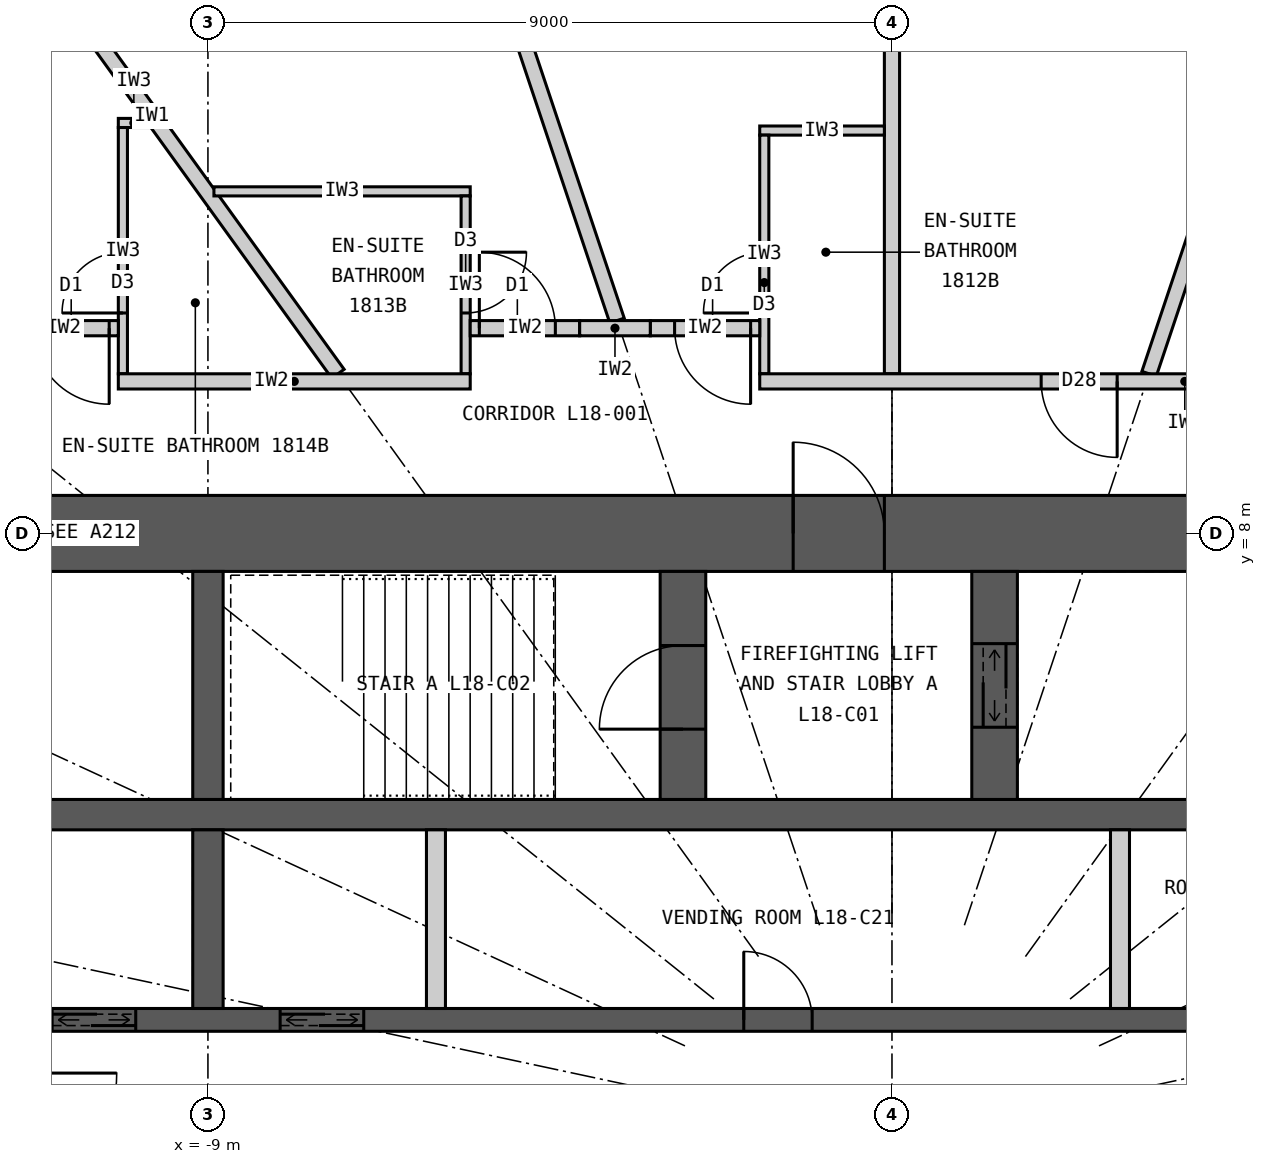
"""IFC4 building model, lengths in metres.
Left out: names, types, materials, properties, quantities, classifications, styles, units other than length and angle.
Written with IfcOpenShell. Run it as: python <this file> out.ifc"""

import sys

from ifc_helpers import new_model, si_unit, direction, frame, frame_2d, origin, place, context, subcontext, project, spatial, rectangle, extrude, element, fill, save


model = new_model("IFC4")
c1 = context("Model", 3, precision=1e-05, world=origin(), true_north=direction((0.0, 1.0)))
c2 = subcontext(c1, "Body", "Model", "MODEL_VIEW")
j1 = project(units=[si_unit("LENGTHUNIT", "METRE"), si_unit("PLANEANGLEUNIT", "RADIAN")], contexts=[c1])
p1 = place(None, origin())
s1 = spatial("IfcSite", under=j1, at=p1, CompositionType="ELEMENT")
p2 = place(p1, origin())
s2 = spatial("IfcBuilding", under=s1, at=p2, CompositionType="ELEMENT")
p3 = place(p2, frame((0.0, 0.0, 73.8)))
s3 = spatial("IfcBuildingStorey", under=s2, at=p3, CompositionType="ELEMENT", Elevation=73.8)
p4 = place(p3, frame((-12.5, 8.0, 0.0), z_axis=(0.0, 0.0, 1.0), x_axis=(1.0, 0.0, 0.0)))
e1 = element("IfcWall", 1, at=p4, inside=s3, PredefinedType="SHEAR", context=c2, shape_type="SweptSolid", body=[
    extrude(rectangle(XDim=25.0, YDim=1.0, at=frame_2d((12.5, 0.0))), origin(), (0.0, 0.0, 1.0), 3.3),
])
p5 = place(p4, frame((11.2, 0.0, 0.0)))
e2 = element("IfcOpeningElement", 2, at=p5, cuts=e1, PredefinedType="OPENING", context=c2, shape_type="SweptSolid", body=[
    extrude(rectangle(XDim=1.2, YDim=2.2, at=frame_2d((0.6, 1.1))), frame((0.0, 0.51, 0.0), z_axis=(0.0, -1.0, 0.0), x_axis=(1.0, 0.0, 0.0)), (0.0, 0.0, 1.0), 1.02),
])
p6 = place(p4, frame((18.8, 0.0, 0.0)))
e3 = element("IfcOpeningElement", 3, at=p6, cuts=e1, PredefinedType="OPENING", context=c2, shape_type="SweptSolid", body=[
    extrude(rectangle(XDim=0.9, YDim=2.2, at=frame_2d((0.45, 1.1))), frame((0.0, 0.51, 0.0), z_axis=(0.0, -1.0, 0.0), x_axis=(1.0, 0.0, 0.0)), (0.0, 0.0, 1.0), 1.02),
])
p7 = place(p3, frame((-11.5, 4.3, 0.0), z_axis=(0.0, 0.0, 1.0), x_axis=(1.0, 0.0, 0.0)))
e4 = element("IfcWall", 4, at=p7, inside=s3, PredefinedType="SHEAR", context=c2, shape_type="SweptSolid", body=[
    extrude(rectangle(XDim=23.0, YDim=0.4, at=frame_2d((11.5, 0.0))), origin(), (0.0, 0.0, 1.0), 3.3),
])
p8 = place(p3, frame((-11.5, 1.6, 0.0), z_axis=(0.0, 0.0, 1.0), x_axis=(1.0, 0.0, 0.0)))
e5 = element("IfcWall", 5, at=p8, inside=s3, PredefinedType="SHEAR", context=c2, shape_type="SweptSolid", body=[
    extrude(rectangle(XDim=23.0, YDim=0.3, at=frame_2d((11.5, 0.0))), origin(), (0.0, 0.0, 1.0), 3.3),
])
p9 = place(p8, frame((0.45, 0.0, 0.0)))
e6 = element("IfcOpeningElement", 6, at=p9, cuts=e5, PredefinedType="OPENING", context=c2, shape_type="SweptSolid", body=[
    extrude(rectangle(XDim=1.1, YDim=2.2, at=frame_2d((0.55, 1.1))), frame((0.0, 0.16, 0.0), z_axis=(0.0, -1.0, 0.0), x_axis=(1.0, 0.0, 0.0)), (0.0, 0.0, 1.0), 0.32),
])
p10 = place(p8, frame((3.45, 0.0, 0.0)))
e7 = element("IfcOpeningElement", 7, at=p10, cuts=e5, PredefinedType="OPENING", context=c2, shape_type="SweptSolid", body=[
    extrude(rectangle(XDim=1.1, YDim=2.2, at=frame_2d((0.55, 1.1))), frame((0.0, 0.16, 0.0), z_axis=(0.0, -1.0, 0.0), x_axis=(1.0, 0.0, 0.0)), (0.0, 0.0, 1.0), 0.32),
])
p11 = place(p8, frame((9.55, 0.0, 0.0)))
e8 = element("IfcOpeningElement", 8, at=p11, cuts=e5, PredefinedType="OPENING", context=c2, shape_type="SweptSolid", body=[
    extrude(rectangle(XDim=0.9, YDim=2.2, at=frame_2d((0.45, 1.1))), frame((0.0, 0.16, 0.0), z_axis=(0.0, -1.0, 0.0), x_axis=(1.0, 0.0, 0.0)), (0.0, 0.0, 1.0), 0.32),
])
p12 = place(p8, frame((15.55, 0.0, 0.0)))
e9 = element("IfcOpeningElement", 9, at=p12, cuts=e5, PredefinedType="OPENING", context=c2, shape_type="SweptSolid", body=[
    extrude(rectangle(XDim=0.9, YDim=2.2, at=frame_2d((0.45, 1.1))), frame((0.0, 0.16, 0.0), z_axis=(0.0, -1.0, 0.0), x_axis=(1.0, 0.0, 0.0)), (0.0, 0.0, 1.0), 0.32),
])
p13 = place(p3, frame((-9.0, 4.5, 0.0), z_axis=(0.0, 0.0, 1.0), x_axis=(0.0, 1.0, 0.0)))
e10 = element("IfcWall", 10, at=p13, inside=s3, PredefinedType="SHEAR", context=c2, shape_type="SweptSolid", body=[
    extrude(rectangle(XDim=3.0, YDim=0.4, at=frame_2d((1.5, 0.0))), origin(), (0.0, 0.0, 1.0), 3.3),
])
p14 = place(p3, frame((-9.0, 1.75, 0.0), z_axis=(0.0, 0.0, 1.0), x_axis=(0.0, 1.0, 0.0)))
e11 = element("IfcWall", 11, at=p14, inside=s3, PredefinedType="SHEAR", context=c2, shape_type="SweptSolid", body=[
    extrude(rectangle(XDim=2.35, YDim=0.4, at=frame_2d((1.175, 0.0))), origin(), (0.0, 0.0, 1.0), 3.3),
])
p15 = place(p3, frame((-2.75, 4.5, 0.0), z_axis=(0.0, 0.0, 1.0), x_axis=(0.0, 1.0, 0.0)))
e12 = element("IfcWall", 12, at=p15, inside=s3, PredefinedType="SHEAR", context=c2, shape_type="SweptSolid", body=[
    extrude(rectangle(XDim=3.0, YDim=0.6, at=frame_2d((1.5, 0.0))), origin(), (0.0, 0.0, 1.0), 3.3),
])
p16 = place(p15, frame((0.925, 0.0, 0.0)))
e13 = element("IfcOpeningElement", 13, at=p16, cuts=e12, PredefinedType="OPENING", context=c2, shape_type="SweptSolid", body=[
    extrude(rectangle(XDim=1.1, YDim=2.2, at=frame_2d((0.55, 1.1))), frame((0.0, 0.31, 0.0), z_axis=(0.0, -1.0, 0.0), x_axis=(1.0, 0.0, 0.0)), (0.0, 0.0, 1.0), 0.62),
])
p17 = place(p3, frame((1.35, 4.5, 0.0), z_axis=(0.0, 0.0, 1.0), x_axis=(0.0, 1.0, 0.0)))
e14 = element("IfcWall", 14, at=p17, inside=s3, PredefinedType="SHEAR", context=c2, shape_type="SweptSolid", body=[
    extrude(rectangle(XDim=3.0, YDim=0.6, at=frame_2d((1.5, 0.0))), origin(), (0.0, 0.0, 1.0), 3.3),
])
p18 = place(p17, frame((0.95, 0.0, 0.0)))
e15 = element("IfcOpeningElement", 15, at=p18, cuts=e14, PredefinedType="OPENING", context=c2, shape_type="SweptSolid", body=[
    extrude(rectangle(XDim=1.1, YDim=2.2, at=frame_2d((0.55, 1.1))), frame((0.0, 0.31, 0.0), z_axis=(0.0, -1.0, 0.0), x_axis=(1.0, 0.0, 0.0)), (0.0, 0.0, 1.0), 0.62),
])
for number, where, z_axis, x_axis in (
    (16, (-6.0, 1.75, 0.0), (0.0, 0.0, 1.0), (0.0, 1.0, 0.0)),
    (17, (3.0, 1.75, 0.0), (0.0, 0.0, 1.0), (0.0, 1.0, 0.0)),
):
    element("IfcWall", number, at=place(p3, frame(where, z_axis=z_axis, x_axis=x_axis)), inside=s3, PredefinedType="PARTITIONING", context=c2, shape_type="SweptSolid", body=[
        extrude(rectangle(XDim=2.35, YDim=0.25, at=frame_2d((1.175, 0.0))), origin(), (0.0, 0.0, 1.0), 3.3),
    ])
p19 = place(p3, frame((3.383, 10.1, 0.0), z_axis=(0.0, 0.0, 1.0), x_axis=(0.31759592231, 0.948226149256, 0.0)))
e18 = element("IfcWall", 18, at=p19, inside=s3, PredefinedType="PARTITIONING", context=c2, shape_type="SweptSolid", body=[
    extrude(rectangle(XDim=9.098, YDim=0.2, at=frame_2d((4.549, 0.0))), origin(), (0.0, 0.0, 1.0), 2.32),
])
p20 = place(p3, frame((0.0, 10.1, 0.0), z_axis=(0.0, 0.0, 1.0), x_axis=(0.0, 1.0, 0.0)))
e19 = element("IfcWall", 19, at=p20, inside=s3, PredefinedType="PARTITIONING", context=c2, shape_type="SweptSolid", body=[
    extrude(rectangle(XDim=9.25, YDim=0.2, at=frame_2d((4.625, 0.0))), origin(), (0.0, 0.0, 1.0), 2.32),
])
p21 = place(p3, frame((-3.617, 10.8, 0.0), z_axis=(0.0, 0.0, 1.0), x_axis=(-0.317576599239, 0.948232621046, 0.0)))
e20 = element("IfcWall", 20, at=p21, inside=s3, PredefinedType="PARTITIONING", context=c2, shape_type="SweptSolid", body=[
    extrude(rectangle(XDim=8.36, YDim=0.2, at=frame_2d((4.18, 0.0))), origin(), (0.0, 0.0, 1.0), 2.32),
])
p22 = place(p3, frame((-7.289, 10.1, 0.0), z_axis=(0.0, 0.0, 1.0), x_axis=(-0.585198353053, 0.810890182197, 0.0)))
e21 = element("IfcWall", 21, at=p22, inside=s3, PredefinedType="PARTITIONING", context=c2, shape_type="SweptSolid", body=[
    extrude(rectangle(XDim=8.36, YDim=0.2, at=frame_2d((4.18, 0.0))), origin(), (0.0, 0.0, 1.0), 2.32),
])
p23 = place(p3, frame((-0.1, 13.3, 0.0), z_axis=(0.0, 0.0, 1.0), x_axis=(-1.0, 0.0, 0.0)))
e22 = element("IfcWall", 22, at=p23, inside=s3, PredefinedType="PARTITIONING", context=c2, shape_type="SweptSolid", body=[
    extrude(rectangle(XDim=1.64, YDim=0.12, at=frame_2d((0.82, 0.0))), origin(), (0.0, 0.0, 1.0), 3.12),
])
p24 = place(p3, frame((-1.68, 10.1, 0.0), z_axis=(0.0, 0.0, 1.0), x_axis=(0.0, 1.0, 0.0)))
e23 = element("IfcWall", 23, at=p24, inside=s3, PredefinedType="PARTITIONING", context=c2, shape_type="SweptSolid", body=[
    extrude(rectangle(XDim=3.14, YDim=0.12, at=frame_2d((1.57, 0.0))), origin(), (0.0, 0.0, 1.0), 3.12),
])
p25 = place(p24, frame((0.8, 0.0, 0.0)))
e24 = element("IfcOpeningElement", 24, at=p25, cuts=e23, PredefinedType="OPENING", context=c2, shape_type="SweptSolid", body=[
    extrude(rectangle(XDim=0.8, YDim=2.1, at=frame_2d((0.4, 1.05))), frame((0.0, 0.07, 0.0), z_axis=(0.0, -1.0, 0.0), x_axis=(1.0, 0.0, 0.0)), (0.0, 0.0, 1.0), 0.14),
])
p26 = place(p3, frame((-8.921, 12.5, 0.0), z_axis=(0.0, 0.0, 1.0), x_axis=(1.0, 0.0, 0.0)))
e25 = element("IfcWall", 25, at=p26, inside=s3, PredefinedType="PARTITIONING", context=c2, shape_type="SweptSolid", body=[
    extrude(rectangle(XDim=3.372, YDim=0.12, at=frame_2d((1.686, 0.0))), origin(), (0.0, 0.0, 1.0), 3.12),
])
p27 = place(p3, frame((-5.609, 10.1, 0.0), z_axis=(0.0, 0.0, 1.0), x_axis=(0.0, 1.0, 0.0)))
e26 = element("IfcWall", 26, at=p27, inside=s3, PredefinedType="PARTITIONING", context=c2, shape_type="SweptSolid", body=[
    extrude(rectangle(XDim=2.34, YDim=0.12, at=frame_2d((1.17, 0.0))), origin(), (0.0, 0.0, 1.0), 3.12),
])
p28 = place(p27, frame((0.8, 0.0, 0.0)))
e27 = element("IfcOpeningElement", 27, at=p28, cuts=e26, PredefinedType="OPENING", context=c2, shape_type="SweptSolid", body=[
    extrude(rectangle(XDim=0.8, YDim=2.1, at=frame_2d((0.4, 1.05))), frame((0.0, 0.07, 0.0), z_axis=(0.0, -1.0, 0.0), x_axis=(1.0, 0.0, 0.0)), (0.0, 0.0, 1.0), 0.14),
])
p29 = place(p3, frame((-9.771, 13.4, 0.0), z_axis=(0.0, 0.0, 1.0), x_axis=(-1.0, 0.0, 0.0)))
e28 = element("IfcWall", 28, at=p29, inside=s3, PredefinedType="PARTITIONING", context=c2, shape_type="SweptSolid", body=[
    extrude(rectangle(XDim=0.408, YDim=0.12, at=frame_2d((0.204, 0.0))), origin(), (0.0, 0.0, 1.0), 3.12),
])
p30 = place(p3, frame((-10.119, 10.1, 0.0), z_axis=(0.0, 0.0, 1.0), x_axis=(0.0, 1.0, 0.0)))
e29 = element("IfcWall", 29, at=p30, inside=s3, PredefinedType="PARTITIONING", context=c2, shape_type="SweptSolid", body=[
    extrude(rectangle(XDim=3.24, YDim=0.12, at=frame_2d((1.62, 0.0))), origin(), (0.0, 0.0, 1.0), 3.12),
])
p31 = place(p30, frame((0.8, 0.0, 0.0)))
e30 = element("IfcOpeningElement", 30, at=p31, cuts=e29, PredefinedType="OPENING", context=c2, shape_type="SweptSolid", body=[
    extrude(rectangle(XDim=0.8, YDim=2.1, at=frame_2d((0.4, 1.05))), frame((0.0, 0.07, 0.0), z_axis=(0.0, -1.0, 0.0), x_axis=(1.0, 0.0, 0.0)), (0.0, 0.0, 1.0), 0.14),
])
p32 = place(p3, frame((-3.18, 10.7, 0.0), z_axis=(0.0, 0.0, 1.0), x_axis=(1.0, 0.0, 0.0)))
e31 = element("IfcWall", 31, at=p32, inside=s3, PredefinedType="PARTITIONING", context=c2, shape_type="SweptSolid", body=[
    extrude(rectangle(XDim=1.44, YDim=0.2, at=frame_2d((0.72, 0.0))), origin(), (0.0, 0.0, 1.0), 3.12),
])
p33 = place(p32, frame((0.32, 0.0, 0.0)))
e32 = element("IfcOpeningElement", 32, at=p33, cuts=e31, PredefinedType="OPENING", context=c2, shape_type="SweptSolid", body=[
    extrude(rectangle(XDim=1.0, YDim=2.2, at=frame_2d((0.5, 1.1))), frame((0.0, 0.11, 0.0), z_axis=(0.0, -1.0, 0.0), x_axis=(1.0, 0.0, 0.0)), (0.0, 0.0, 1.0), 0.22),
])
p34 = place(p3, frame((-5.549, 10.7, 0.0), z_axis=(0.0, 0.0, 1.0), x_axis=(1.0, 0.0, 0.0)))
e33 = element("IfcWall", 33, at=p34, inside=s3, PredefinedType="PARTITIONING", context=c2, shape_type="SweptSolid", body=[
    extrude(rectangle(XDim=1.44, YDim=0.2, at=frame_2d((0.72, 0.0))), origin(), (0.0, 0.0, 1.0), 3.12),
])
p35 = place(p34, frame((0.12, 0.0, 0.0)))
e34 = element("IfcOpeningElement", 34, at=p35, cuts=e33, PredefinedType="OPENING", context=c2, shape_type="SweptSolid", body=[
    extrude(rectangle(XDim=1.0, YDim=2.2, at=frame_2d((0.5, 1.1))), frame((0.0, 0.11, 0.0), z_axis=(0.0, -1.0, 0.0), x_axis=(1.0, 0.0, 0.0)), (0.0, 0.0, 1.0), 0.22),
])
p36 = place(p3, frame((-11.619, 10.7, 0.0), z_axis=(0.0, 0.0, 1.0), x_axis=(1.0, 0.0, 0.0)))
e35 = element("IfcWall", 35, at=p36, inside=s3, PredefinedType="PARTITIONING", context=c2, shape_type="SweptSolid", body=[
    extrude(rectangle(XDim=1.44, YDim=0.2, at=frame_2d((0.72, 0.0))), origin(), (0.0, 0.0, 1.0), 3.12),
])
p37 = place(p36, frame((0.32, 0.0, 0.0)))
e36 = element("IfcOpeningElement", 36, at=p37, cuts=e35, PredefinedType="OPENING", context=c2, shape_type="SweptSolid", body=[
    extrude(rectangle(XDim=1.0, YDim=2.2, at=frame_2d((0.5, 1.1))), frame((0.0, 0.11, 0.0), z_axis=(0.0, -1.0, 0.0), x_axis=(1.0, 0.0, 0.0)), (0.0, 0.0, 1.0), 0.22),
])
p38 = place(p3, frame((-4.109, 10.7, 0.0), z_axis=(0.0, 0.0, 1.0), x_axis=(1.0, 0.0, 0.0)))
e37 = element("IfcWall", 37, at=p38, inside=s3, PredefinedType="PARTITIONING", context=c2, shape_type="SweptSolid", body=[
    extrude(rectangle(XDim=0.929, YDim=0.2, at=frame_2d((0.465, 0.0))), origin(), (0.0, 0.0, 1.0), 3.12),
])
p39 = place(p3, frame((-10.179, 10.0, 0.0), z_axis=(0.0, 0.0, 1.0), x_axis=(1.0, 0.0, 0.0)))
e38 = element("IfcWall", 38, at=p39, inside=s3, PredefinedType="PARTITIONING", context=c2, shape_type="SweptSolid", body=[
    extrude(rectangle(XDim=4.63, YDim=0.2, at=frame_2d((2.315, 0.0))), origin(), (0.0, 0.0, 1.0), 3.12),
])
p40 = place(p3, frame((-1.74, 10.0, 0.0), z_axis=(0.0, 0.0, 1.0), x_axis=(1.0, 0.0, 0.0)))
e39 = element("IfcWall", 39, at=p40, inside=s3, PredefinedType="PARTITIONING", context=c2, shape_type="SweptSolid", body=[
    extrude(rectangle(XDim=11.185, YDim=0.2, at=frame_2d((5.593, 0.0))), origin(), (0.0, 0.0, 1.0), 3.12),
])
p41 = place(p40, frame((7.609, 0.0, 0.0)))
e40 = element("IfcOpeningElement", 40, at=p41, cuts=e39, PredefinedType="OPENING", context=c2, shape_type="SweptSolid", body=[
    extrude(rectangle(XDim=1.0, YDim=2.2, at=frame_2d((0.5, 1.1))), frame((0.0, 0.11, 0.0), z_axis=(0.0, -1.0, 0.0), x_axis=(1.0, 0.0, 0.0)), (0.0, 0.0, 1.0), 0.22),
])
p42 = place(p40, frame((3.703, 0.0, 0.0)))
e41 = element("IfcOpeningElement", 41, at=p42, cuts=e39, PredefinedType="OPENING", context=c2, shape_type="SweptSolid", body=[
    extrude(rectangle(XDim=1.0, YDim=2.2, at=frame_2d((0.5, 1.1))), frame((0.0, 0.11, 0.0), z_axis=(0.0, -1.0, 0.0), x_axis=(1.0, 0.0, 0.0)), (0.0, 0.0, 1.0), 0.22),
])
p43 = place(p42, origin())
e42 = element("IfcDoor", 42, at=p43, inside=s3, OperationType="SINGLE_SWING_RIGHT", PredefinedType="DOOR", context=c2, shape_type="SweptSolid", body=[
    extrude(rectangle(XDim=1.0, YDim=2.2, at=frame_2d((0.5, 1.1))), frame((0.0, 0.025, 0.0), z_axis=(0.0, -1.0, 0.0), x_axis=(1.0, 0.0, 0.0)), (0.0, 0.0, 1.0), 0.05),
])
fill(e41, e42)
p44 = place(p25, origin())
e43 = element("IfcDoor", 43, at=p44, inside=s3, OperationType="SINGLE_SWING_LEFT", PredefinedType="DOOR", context=c2, shape_type="SweptSolid", body=[
    extrude(rectangle(XDim=0.8, YDim=2.1, at=frame_2d((0.4, 1.05))), frame((0.0, 0.025, 0.0), z_axis=(0.0, -1.0, 0.0), x_axis=(1.0, 0.0, 0.0)), (0.0, 0.0, 1.0), 0.05),
])
fill(e24, e43)
p45 = place(p33, origin())
e44 = element("IfcDoor", 44, at=p45, inside=s3, OperationType="SINGLE_SWING_RIGHT", PredefinedType="DOOR", context=c2, shape_type="SweptSolid", body=[
    extrude(rectangle(XDim=1.0, YDim=2.2, at=frame_2d((0.5, 1.1))), frame((0.0, 0.025, 0.0), z_axis=(0.0, -1.0, 0.0), x_axis=(1.0, 0.0, 0.0)), (0.0, 0.0, 1.0), 0.05),
])
fill(e32, e44)
p46 = place(p28, origin())
e45 = element("IfcDoor", 45, at=p46, inside=s3, OperationType="SINGLE_SWING_RIGHT", PredefinedType="DOOR", context=c2, shape_type="SweptSolid", body=[
    extrude(rectangle(XDim=0.8, YDim=2.1, at=frame_2d((0.4, 1.05))), frame((0.0, 0.025, 0.0), z_axis=(0.0, -1.0, 0.0), x_axis=(1.0, 0.0, 0.0)), (0.0, 0.0, 1.0), 0.05),
])
fill(e27, e45)
p47 = place(p35, origin())
e46 = element("IfcDoor", 46, at=p47, inside=s3, OperationType="SINGLE_SWING_LEFT", PredefinedType="DOOR", context=c2, shape_type="SweptSolid", body=[
    extrude(rectangle(XDim=1.0, YDim=2.2, at=frame_2d((0.5, 1.1))), frame((0.0, 0.025, 0.0), z_axis=(0.0, -1.0, 0.0), x_axis=(1.0, 0.0, 0.0)), (0.0, 0.0, 1.0), 0.05),
])
fill(e34, e46)
p48 = place(p31, origin())
e47 = element("IfcDoor", 47, at=p48, inside=s3, OperationType="SINGLE_SWING_LEFT", PredefinedType="DOOR", context=c2, shape_type="SweptSolid", body=[
    extrude(rectangle(XDim=0.8, YDim=2.1, at=frame_2d((0.4, 1.05))), frame((0.0, 0.025, 0.0), z_axis=(0.0, -1.0, 0.0), x_axis=(1.0, 0.0, 0.0)), (0.0, 0.0, 1.0), 0.05),
])
fill(e30, e47)
p49 = place(p37, origin())
e48 = element("IfcDoor", 48, at=p49, inside=s3, OperationType="SINGLE_SWING_RIGHT", PredefinedType="DOOR", context=c2, shape_type="SweptSolid", body=[
    extrude(rectangle(XDim=1.0, YDim=2.2, at=frame_2d((0.5, 1.1))), frame((0.0, 0.025, 0.0), z_axis=(0.0, -1.0, 0.0), x_axis=(1.0, 0.0, 0.0)), (0.0, 0.0, 1.0), 0.05),
])
fill(e36, e48)
p50 = place(p5, origin())
e49 = element("IfcDoor", 49, at=p50, inside=s3, OperationType="SINGLE_SWING_LEFT", PredefinedType="DOOR", context=c2, shape_type="SweptSolid", body=[
    extrude(rectangle(XDim=1.2, YDim=2.2, at=frame_2d((0.6, 1.1))), frame((0.0, 0.025, 0.0), z_axis=(0.0, -1.0, 0.0), x_axis=(1.0, 0.0, 0.0)), (0.0, 0.0, 1.0), 0.05),
])
fill(e2, e49)
p51 = place(p16, origin())
e50 = element("IfcDoor", 50, at=p51, inside=s3, OperationType="SINGLE_SWING_LEFT", PredefinedType="DOOR", context=c2, shape_type="SweptSolid", body=[
    extrude(rectangle(XDim=1.1, YDim=2.2, at=frame_2d((0.55, 1.1))), frame((0.0, 0.025, 0.0), z_axis=(0.0, -1.0, 0.0), x_axis=(1.0, 0.0, 0.0)), (0.0, 0.0, 1.0), 0.05),
])
fill(e13, e50)
p52 = place(p18, origin())
e51 = element("IfcDoor", 51, at=p52, inside=s3, OperationType="DOUBLE_DOOR_SLIDING", PredefinedType="DOOR", context=c2, shape_type="SweptSolid", body=[
    extrude(rectangle(XDim=1.1, YDim=2.2, at=frame_2d((0.55, 1.1))), frame((0.0, 0.025, 0.0), z_axis=(0.0, -1.0, 0.0), x_axis=(1.0, 0.0, 0.0)), (0.0, 0.0, 1.0), 0.05),
])
fill(e15, e51)
p53 = place(p9, origin())
e52 = element("IfcDoor", 52, at=p53, inside=s3, OperationType="DOUBLE_DOOR_SLIDING", PredefinedType="DOOR", context=c2, shape_type="SweptSolid", body=[
    extrude(rectangle(XDim=1.1, YDim=2.2, at=frame_2d((0.55, 1.1))), frame((0.0, 0.025, 0.0), z_axis=(0.0, -1.0, 0.0), x_axis=(1.0, 0.0, 0.0)), (0.0, 0.0, 1.0), 0.05),
])
fill(e6, e52)
p54 = place(p10, origin())
e53 = element("IfcDoor", 53, at=p54, inside=s3, OperationType="DOUBLE_DOOR_SLIDING", PredefinedType="DOOR", context=c2, shape_type="SweptSolid", body=[
    extrude(rectangle(XDim=1.1, YDim=2.2, at=frame_2d((0.55, 1.1))), frame((0.0, 0.025, 0.0), z_axis=(0.0, -1.0, 0.0), x_axis=(1.0, 0.0, 0.0)), (0.0, 0.0, 1.0), 0.05),
])
fill(e7, e53)
p55 = place(p11, origin())
e54 = element("IfcDoor", 54, at=p55, inside=s3, OperationType="SINGLE_SWING_LEFT", PredefinedType="DOOR", context=c2, shape_type="SweptSolid", body=[
    extrude(rectangle(XDim=0.9, YDim=2.2, at=frame_2d((0.45, 1.1))), frame((0.0, 0.025, 0.0), z_axis=(0.0, -1.0, 0.0), x_axis=(1.0, 0.0, 0.0)), (0.0, 0.0, 1.0), 0.05),
])
fill(e8, e54)
save(model, sys.argv[1])
